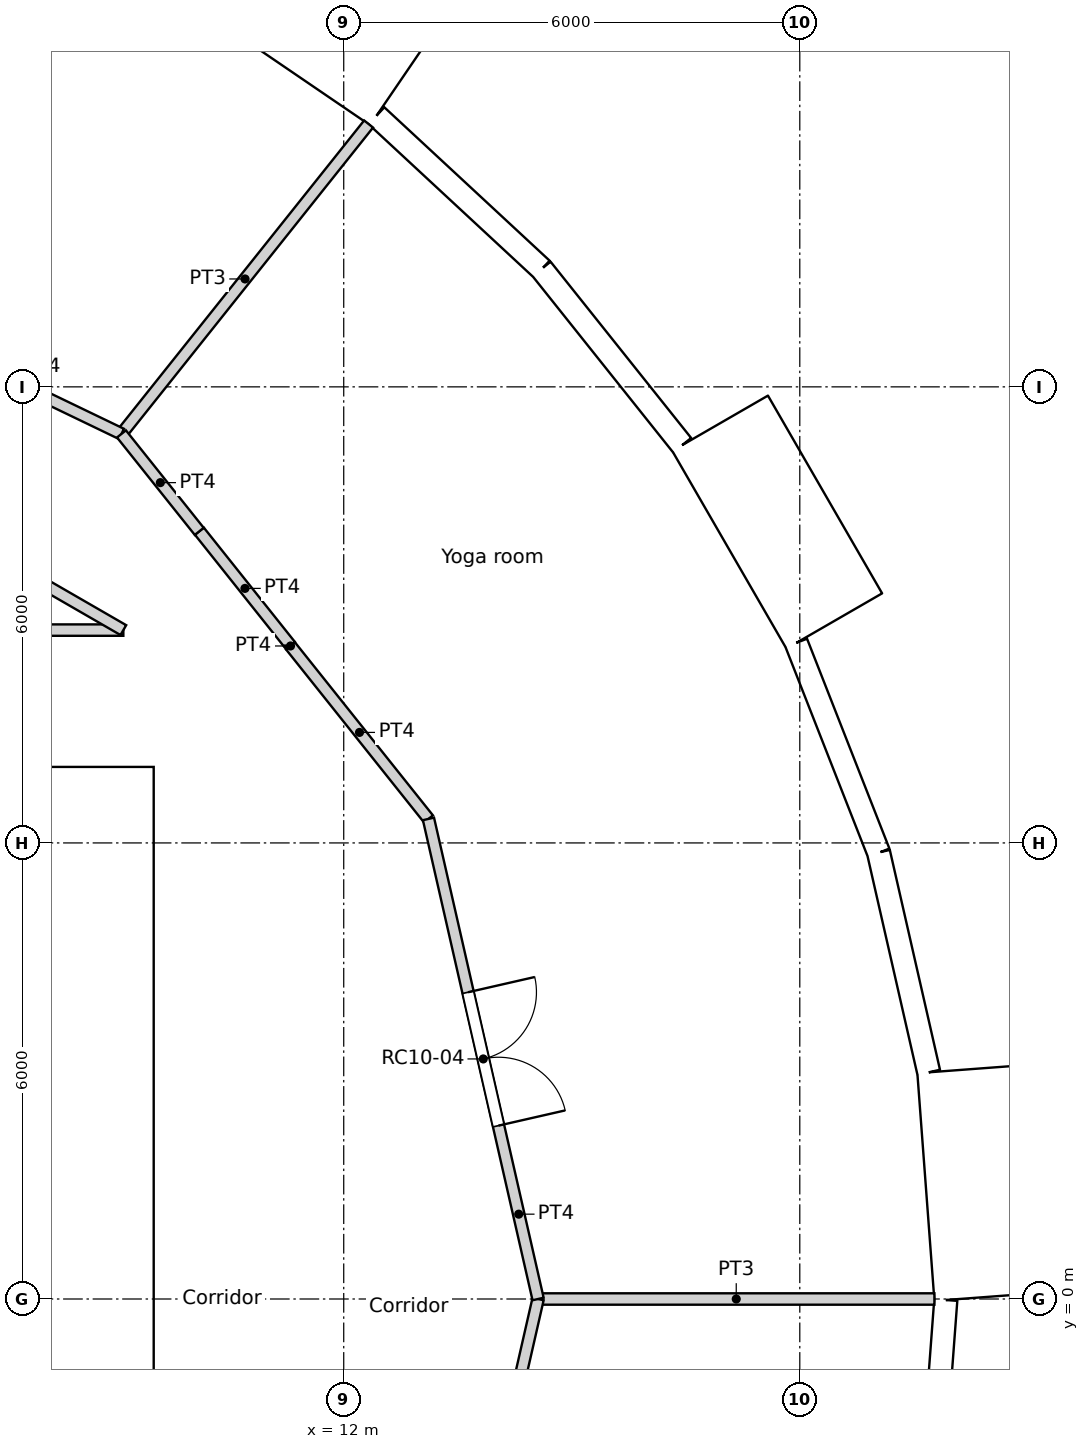
"""IFC4 building model, lengths in metres.
Left out: names, types, materials, properties, quantities, classifications, styles, units other than length and angle.
Written with IfcOpenShell. Run it as: python <this file> out.ifc"""

import sys

from ifc_helpers import new_model, si_unit, direction, frame, frame_2d, origin, origin_2d, place, context, subcontext, project, spatial, rectangle, circle, extrude, element, fill, save


model = new_model("IFC4")
c1 = context("Model", 3, precision=1e-05, world=origin(), true_north=direction((0.0, 1.0)))
c2 = subcontext(c1, "Body", "Model", "MODEL_VIEW")
j1 = project(units=[si_unit("LENGTHUNIT", "METRE"), si_unit("PLANEANGLEUNIT", "RADIAN")], contexts=[c1])
p1 = place(None, origin())
s1 = spatial("IfcSite", under=j1, at=p1, CompositionType="ELEMENT")
p2 = place(p1, origin())
s2 = spatial("IfcBuilding", under=s1, at=p2, CompositionType="ELEMENT")
p3 = place(p2, frame((0.0, 0.0, 323.4)))
s3 = spatial("IfcBuildingStorey", under=s2, at=p3, CompositionType="ELEMENT", Elevation=323.4)
for number, where, z_axis, x_axis in (
    (1, (18.822, 0.0, 0.0), (0.0, 0.0, 1.0), (1.0, 0.0, 0.0)),
    (2, (17.986, 5.548, 0.0), (0.0, 0.0, 1.0), (1.0, 0.0, 0.0)),
    (3, (15.552, 10.603, 0.0), (0.0, 0.0, 1.0), (1.0, 0.0, 0.0)),
    (4, (11.735, 14.716, 0.0), (0.0, 0.0, 1.0), (1.0, 0.0, 0.0)),
):
    element("IfcColumn", number, at=place(p3, frame(where, z_axis=z_axis, x_axis=x_axis)), inside=s3, PredefinedType="COLUMN", context=c2, shape_type="SweptSolid", body=[
        extrude(circle(Radius=0.45, at=origin_2d()), origin(), (0.0, 0.0, 1.0), 3.6),
    ])
p4 = place(p3, frame((20.496, 0.032, -0.35), z_axis=(0.0, 0.0, 1.0), x_axis=(-0.074785902127, 0.997199613339, 0.0)))
e5 = element("IfcWall", 5, at=p4, inside=s3, PredefinedType="ELEMENTEDWALL", context=c2, shape_type="SweptSolid", body=[
    extrude(rectangle(XDim=3.0, YDim=1.45, at=frame_2d((1.5, 0.0))), origin(), (0.0, 0.0, 1.0), 3.6),
])
p5 = place(p4, frame((1.5, 0.0, 1.9)))
e6 = element("IfcOpeningElement", 6, at=p5, cuts=e5, PredefinedType="OPENING", context=c2, shape_type="SweptSolid", body=[
    extrude(circle(Radius=0.9, at=origin_2d()), frame((0.0, 0.735, 0.0), z_axis=(0.0, -1.0, 0.0), x_axis=(1.0, 0.0, 0.0)), (0.0, 0.0, 1.0), 1.47),
])
p6 = place(p3, frame((19.696, 2.984, 0.0), z_axis=(0.0, 0.0, 1.0), x_axis=(-0.222529389789, 0.974925982155, 0.0)))
e7 = element("IfcWall", 7, at=p6, inside=s3, PredefinedType="SOLIDWALL", context=c2, shape_type="SweptSolid", body=[
    extrude(rectangle(XDim=2.962, YDim=0.3, at=frame_2d((1.481, 0.0))), origin(), (0.0, 0.0, 1.0), 3.25),
])
p7 = place(p6, frame((1.481, 0.0, 1.55)))
e8 = element("IfcOpeningElement", 8, at=p7, cuts=e7, PredefinedType="OPENING", context=c2, shape_type="SweptSolid", body=[
    extrude(circle(Radius=0.9, at=origin_2d()), frame((0.0, 0.16, 0.0), z_axis=(0.0, -1.0, 0.0), x_axis=(1.0, 0.0, 0.0)), (0.0, 0.0, 1.0), 0.32),
])
p8 = place(p3, frame((19.037, 5.872, 0.0), z_axis=(0.0, 0.0, 1.0), x_axis=(-0.36530043032, 0.930889679612, 0.0)))
e9 = element("IfcWall", 9, at=p8, inside=s3, PredefinedType="SOLIDWALL", context=c2, shape_type="SweptSolid", body=[
    extrude(rectangle(XDim=2.962, YDim=0.3, at=frame_2d((1.481, 0.0))), origin(), (0.0, 0.0, 1.0), 3.25),
])
p9 = place(p8, frame((1.481, 0.0, 1.55)))
e10 = element("IfcOpeningElement", 10, at=p9, cuts=e9, PredefinedType="OPENING", context=c2, shape_type="SweptSolid", body=[
    extrude(circle(Radius=0.9, at=origin_2d()), frame((0.0, 0.16, 0.0), z_axis=(0.0, -1.0, 0.0), x_axis=(1.0, 0.0, 0.0)), (0.0, 0.0, 1.0), 0.32),
])
p10 = place(p3, frame((18.452, 8.921, -0.35), z_axis=(0.0, 0.0, 1.0), x_axis=(-0.499990139034, 0.866031096941, 0.0)))
e11 = element("IfcWall", 11, at=p10, inside=s3, PredefinedType="ELEMENTEDWALL", context=c2, shape_type="SweptSolid", body=[
    extrude(rectangle(XDim=3.0, YDim=1.45, at=frame_2d((1.5, 0.0))), origin(), (0.0, 0.0, 1.0), 3.6),
])
p11 = place(p10, frame((1.5, 0.0, 1.9)))
e12 = element("IfcOpeningElement", 12, at=p11, cuts=e11, PredefinedType="OPENING", context=c2, shape_type="SweptSolid", body=[
    extrude(circle(Radius=0.9, at=origin_2d()), frame((0.0, 0.735, 0.0), z_axis=(0.0, -1.0, 0.0), x_axis=(1.0, 0.0, 0.0)), (0.0, 0.0, 1.0), 1.47),
])
p12 = place(p3, frame((16.451, 11.234, 0.0), z_axis=(0.0, 0.0, 1.0), x_axis=(-0.623498236992, 0.781824755599, 0.0)))
e13 = element("IfcWall", 13, at=p12, inside=s3, PredefinedType="SOLIDWALL", context=c2, shape_type="SweptSolid", body=[
    extrude(rectangle(XDim=2.962, YDim=0.3, at=frame_2d((1.481, 0.0))), origin(), (0.0, 0.0, 1.0), 3.25),
])
p13 = place(p12, frame((1.481, 0.0, 1.55)))
e14 = element("IfcOpeningElement", 14, at=p13, cuts=e13, PredefinedType="OPENING", context=c2, shape_type="SweptSolid", body=[
    extrude(circle(Radius=0.9, at=origin_2d()), frame((0.0, 0.16, 0.0), z_axis=(0.0, -1.0, 0.0), x_axis=(1.0, 0.0, 0.0)), (0.0, 0.0, 1.0), 0.32),
])
p14 = place(p3, frame((14.604, 13.55, 0.0), z_axis=(0.0, 0.0, 1.0), x_axis=(-0.733066412643, 0.680157066165, 0.0)))
e15 = element("IfcWall", 15, at=p14, inside=s3, PredefinedType="SOLIDWALL", context=c2, shape_type="SweptSolid", body=[
    extrude(rectangle(XDim=2.962, YDim=0.3, at=frame_2d((1.481, 0.0))), origin(), (0.0, 0.0, 1.0), 3.25),
])
p15 = place(p14, frame((1.481, 0.0, 1.55)))
e16 = element("IfcOpeningElement", 16, at=p15, cuts=e15, PredefinedType="OPENING", context=c2, shape_type="SweptSolid", body=[
    extrude(circle(Radius=0.9, at=origin_2d()), frame((0.0, 0.16, 0.0), z_axis=(0.0, -1.0, 0.0), x_axis=(1.0, 0.0, 0.0)), (0.0, 0.0, 1.0), 0.32),
])
p16 = place(p3, frame((12.754, 16.044, -0.35), z_axis=(0.0, 0.0, 1.0), x_axis=(-0.826246281157, 0.563309047392, 0.0)))
e17 = element("IfcWall", 17, at=p16, inside=s3, PredefinedType="ELEMENTEDWALL", context=c2, shape_type="SweptSolid", body=[
    extrude(rectangle(XDim=3.0, YDim=1.45, at=frame_2d((1.5, 0.0))), origin(), (0.0, 0.0, 1.0), 3.6),
])
p17 = place(p16, frame((1.5, 0.0, 1.9)))
e18 = element("IfcOpeningElement", 18, at=p17, cuts=e17, PredefinedType="OPENING", context=c2, shape_type="SweptSolid", body=[
    extrude(circle(Radius=0.9, at=origin_2d()), frame((0.0, 0.735, 0.0), z_axis=(0.0, -1.0, 0.0), x_axis=(1.0, 0.0, 0.0)), (0.0, 0.0, 1.0), 1.47),
])
p18 = place(p3, frame((19.699, -2.969, 0.0), z_axis=(0.0, 0.0, 1.0), x_axis=(0.07474897196, 0.997202382263, 0.0)))
e19 = element("IfcWall", 19, at=p18, inside=s3, PredefinedType="SOLIDWALL", context=c2, shape_type="SweptSolid", body=[
    extrude(rectangle(XDim=2.962, YDim=0.3, at=frame_2d((1.481, 0.0))), origin(), (0.0, 0.0, 1.0), 3.25),
])
p19 = place(p18, frame((1.481, 0.0, 1.55)))
e20 = element("IfcOpeningElement", 20, at=p19, cuts=e19, PredefinedType="OPENING", context=c2, shape_type="SweptSolid", body=[
    extrude(circle(Radius=0.9, at=origin_2d()), frame((0.0, 0.16, 0.0), z_axis=(0.0, -1.0, 0.0), x_axis=(1.0, 0.0, 0.0)), (0.0, 0.0, 1.0), 0.32),
])
p20 = place(p3, frame((-9.5, 6.7, 0.0), z_axis=(0.0, 0.0, 1.0), x_axis=(1.0, 0.0, 0.0)))
e21 = element("IfcWall", 21, at=p20, inside=s3, PredefinedType="SOLIDWALL", context=c2, shape_type="SweptSolid", body=[
    extrude(rectangle(XDim=19.0, YDim=0.6, at=frame_2d((9.5, 0.0))), origin(), (0.0, 0.0, 1.0), 3.6),
])
p21 = place(p20, frame((5.35, 0.0, 0.0)))
e22 = element("IfcOpeningElement", 22, at=p21, cuts=e21, PredefinedType="OPENING", context=c2, shape_type="SweptSolid", body=[
    extrude(rectangle(XDim=1.7, YDim=2.1, at=frame_2d((0.85, 1.05))), frame((0.0, 0.3, 0.0), z_axis=(0.0, -1.0, 0.0), x_axis=(1.0, 0.0, 0.0)), (0.0, 0.0, 1.0), 0.6),
])
p22 = place(p3, frame((9.2, -6.4, 0.0), z_axis=(0.0, 0.0, 1.0), x_axis=(0.0, 1.0, 0.0)))
e23 = element("IfcWall", 23, at=p22, inside=s3, PredefinedType="SOLIDWALL", context=c2, shape_type="SweptSolid", body=[
    extrude(rectangle(XDim=12.8, YDim=0.6, at=frame_2d((6.4, 0.0))), origin(), (0.0, 0.0, 1.0), 3.6),
])
p23 = place(p22, frame((6.4, 0.0, 0.0)))
e24 = element("IfcOpeningElement", 24, at=p23, cuts=e23, PredefinedType="OPENING", context=c2, shape_type="SweptSolid", body=[
    extrude(rectangle(XDim=1.8, YDim=2.1, at=frame_2d((0.9, 1.05))), frame((0.0, 0.3, 0.0), z_axis=(0.0, -1.0, 0.0), x_axis=(1.0, 0.0, 0.0)), (0.0, 0.0, 1.0), 0.6),
])
p24 = place(p3, frame((-4.35, 3.1, 0.0), z_axis=(0.0, 0.0, 1.0), x_axis=(1.0, 0.0, 0.0)))
e25 = element("IfcWall", 25, at=p24, inside=s3, PredefinedType="SOLIDWALL", context=c2, shape_type="SweptSolid", body=[
    extrude(rectangle(XDim=13.25, YDim=0.3, at=frame_2d((6.625, 0.0))), origin(), (0.0, 0.0, 1.0), 3.25),
])
p25 = place(p24, frame((2.95, 0.0, 0.0)))
e26 = element("IfcOpeningElement", 26, at=p25, cuts=e25, PredefinedType="OPENING", context=c2, shape_type="SweptSolid", body=[
    extrude(rectangle(XDim=1.1, YDim=2.1, at=frame_2d((0.55, 1.05))), frame((0.0, 0.15, 0.0), z_axis=(0.0, -1.0, 0.0), x_axis=(1.0, 0.0, 0.0)), (0.0, 0.0, 1.0), 0.3),
])
p26 = place(p24, frame((5.75, 0.0, 0.0)))
e27 = element("IfcOpeningElement", 27, at=p26, cuts=e25, PredefinedType="OPENING", context=c2, shape_type="SweptSolid", body=[
    extrude(rectangle(XDim=1.1, YDim=2.1, at=frame_2d((0.55, 1.05))), frame((0.0, 0.15, 0.0), z_axis=(0.0, -1.0, 0.0), x_axis=(1.0, 0.0, 0.0)), (0.0, 0.0, 1.0), 0.3),
])
p27 = place(p24, frame((8.55, 0.0, 0.0)))
e28 = element("IfcOpeningElement", 28, at=p27, cuts=e25, PredefinedType="OPENING", context=c2, shape_type="SweptSolid", body=[
    extrude(rectangle(XDim=1.1, YDim=2.1, at=frame_2d((0.55, 1.05))), frame((0.0, 0.15, 0.0), z_axis=(0.0, -1.0, 0.0), x_axis=(1.0, 0.0, 0.0)), (0.0, 0.0, 1.0), 0.3),
])
p28 = place(p3, frame((-0.014, 8.8, 0.0), z_axis=(0.0, 0.0, 1.0), x_axis=(1.0, 0.0, 0.0)))
e29 = element("IfcWall", 29, at=p28, inside=s3, PredefinedType="PARTITIONING", context=c2, shape_type="SweptSolid", body=[
    extrude(rectangle(XDim=9.115, YDim=0.15, at=frame_2d((4.557, 0.0))), origin(), (0.0, 0.0, 1.0), 3.25),
])
p29 = place(p28, frame((4.053, 0.0, 0.0)))
e30 = element("IfcOpeningElement", 30, at=p29, cuts=e29, PredefinedType="OPENING", context=c2, shape_type="SweptSolid", body=[
    extrude(rectangle(XDim=1.0, YDim=2.04, at=frame_2d((0.5, 1.02))), frame((0.0, 0.075, 0.0), z_axis=(0.0, -1.0, 0.0), x_axis=(1.0, 0.0, 0.0)), (0.0, 0.0, 1.0), 0.15),
])
p30 = place(p3, frame((10.101, 10.101, 0.0), z_axis=(0.0, 0.0, 1.0), x_axis=(0.623130947784, -0.782117524362, 0.0)))
e31 = element("IfcWall", 31, at=p30, inside=s3, PredefinedType="PARTITIONING", context=c2, shape_type="SweptSolid", body=[
    extrude(rectangle(XDim=1.924, YDim=0.15, at=frame_2d((0.962, 0.0))), origin(), (0.0, 0.0, 1.0), 3.25),
])
p31 = place(p3, frame((11.3, 8.586, 0.0), z_axis=(0.0, 0.0, 1.0), x_axis=(0.0, 1.0, 0.0)))
e32 = element("IfcWall", 32, at=p31, inside=s3, PredefinedType="PARTITIONING", context=c2, shape_type="SweptSolid", body=[
    extrude(rectangle(XDim=0.01, YDim=0.15, at=frame_2d((0.005, 0.0))), origin(), (0.0, 0.0, 1.0), 3.25),
])
p32 = place(p3, frame((11.3, 8.592, 0.0), z_axis=(0.0, 0.0, 1.0), x_axis=(0.623446514299, -0.781866001185, 0.0)))
e33 = element("IfcWall", 33, at=p32, inside=s3, PredefinedType="PARTITIONING", context=c2, shape_type="SweptSolid", body=[
    extrude(rectangle(XDim=2.911, YDim=0.15, at=frame_2d((1.456, 0.0))), origin(), (0.0, 0.0, 1.0), 3.25),
])
p33 = place(p3, frame((13.115, 6.316, 0.0), z_axis=(0.0, 0.0, 1.0), x_axis=(0.222568978642, -0.97491694505, 0.0)))
e34 = element("IfcWall", 34, at=p33, inside=s3, PredefinedType="PARTITIONING", context=c2, shape_type="SweptSolid", body=[
    extrude(rectangle(XDim=6.479, YDim=0.15, at=frame_2d((3.239, 0.0))), origin(), (0.0, 0.0, 1.0), 3.25),
])
p34 = place(p33, frame((2.339, 0.0, 0.0)))
e35 = element("IfcOpeningElement", 35, at=p34, cuts=e34, PredefinedType="OPENING", context=c2, shape_type="SweptSolid", body=[
    extrude(rectangle(XDim=1.8, YDim=2.1, at=frame_2d((0.9, 1.05))), frame((0.0, 0.075, 0.0), z_axis=(0.0, -1.0, 0.0), x_axis=(1.0, 0.0, 0.0)), (0.0, 0.0, 1.0), 0.15),
])
p35 = place(p3, frame((13.115, -6.316, 0.0), z_axis=(0.0, 0.0, 1.0), x_axis=(0.222568978642, 0.97491694505, 0.0)))
e36 = element("IfcWall", 36, at=p35, inside=s3, PredefinedType="PARTITIONING", context=c2, shape_type="SweptSolid", body=[
    extrude(rectangle(XDim=6.479, YDim=0.15, at=frame_2d((3.239, 0.0))), origin(), (0.0, 0.0, 1.0), 3.25),
])
p36 = place(p35, frame((2.74, 0.0, 0.0)))
e37 = element("IfcOpeningElement", 37, at=p36, cuts=e36, PredefinedType="OPENING", context=c2, shape_type="SweptSolid", body=[
    extrude(rectangle(XDim=1.0, YDim=2.04, at=frame_2d((0.5, 1.02))), frame((0.0, 0.075, 0.0), z_axis=(0.0, -1.0, 0.0), x_axis=(1.0, 0.0, 0.0)), (0.0, 0.0, 1.0), 0.15),
])
p37 = place(p3, frame((3.261, 12.171, 0.0), z_axis=(0.0, 0.0, 1.0), x_axis=(0.866066809554, -0.499928276245, 0.0)))
e38 = element("IfcWall", 38, at=p37, inside=s3, PredefinedType="PARTITIONING", context=c2, shape_type="SweptSolid", body=[
    extrude(rectangle(XDim=6.743, YDim=0.15, at=frame_2d((3.371, 0.0))), origin(), (0.0, 0.0, 1.0), 3.25),
])
p38 = place(p3, frame((9.076, 11.381, 0.0), z_axis=(0.0, 0.0, 1.0), x_axis=(0.623805208652, -0.781579849829, 0.0)))
e39 = element("IfcWall", 39, at=p38, inside=s3, PredefinedType="PARTITIONING", context=c2, shape_type="SweptSolid", body=[
    extrude(rectangle(XDim=1.64, YDim=0.15, at=frame_2d((0.82, 0.0))), origin(), (0.0, 0.0, 1.0), 3.25),
])
p39 = place(p3, frame((3.239, 14.192, 0.0), z_axis=(0.0, 0.0, 1.0), x_axis=(0.900976027191, -0.433868872388, 0.0)))
e40 = element("IfcWall", 40, at=p39, inside=s3, PredefinedType="PARTITIONING", context=c2, shape_type="SweptSolid", body=[
    extrude(rectangle(XDim=6.479, YDim=0.15, at=frame_2d((3.239, 0.0))), origin(), (0.0, 0.0, 1.0), 3.25),
])
p40 = place(p39, frame((2.339, 0.0, 0.0)))
e41 = element("IfcOpeningElement", 41, at=p40, cuts=e40, PredefinedType="OPENING", context=c2, shape_type="SweptSolid", body=[
    extrude(rectangle(XDim=1.8, YDim=2.1, at=frame_2d((0.9, 1.05))), frame((0.0, 0.075, 0.0), z_axis=(0.0, -1.0, 0.0), x_axis=(1.0, 0.0, 0.0)), (0.0, 0.0, 1.0), 0.15),
])
p41 = place(p3, frame((9.076, 11.381, 0.0), z_axis=(0.0, 0.0, 1.0), x_axis=(0.623460949534, 0.781854490558, 0.0)))
e42 = element("IfcWall", 42, at=p41, inside=s3, PredefinedType="PARTITIONING", context=c2, shape_type="SweptSolid", body=[
    extrude(rectangle(XDim=5.214, YDim=0.15, at=frame_2d((2.607, 0.0))), origin(), (0.0, 0.0, 1.0), 3.25),
])
p42 = place(p3, frame((14.557, 0.0, 0.0), z_axis=(0.0, 0.0, 1.0), x_axis=(1.0, 0.0, 0.0)))
e43 = element("IfcWall", 43, at=p42, inside=s3, PredefinedType="PARTITIONING", context=c2, shape_type="SweptSolid", body=[
    extrude(rectangle(XDim=5.214, YDim=0.15, at=frame_2d((2.607, 0.0))), origin(), (0.0, 0.0, 1.0), 3.25),
])
p43 = place(p5, origin())
e44 = element("IfcWindow", 44, at=p43, inside=s3, PartitioningType="SINGLE_PANEL", PredefinedType="WINDOW", context=c2, shape_type="SweptSolid", body=[
    extrude(circle(Radius=0.9, at=origin_2d()), frame((0.0, 0.695, 0.0), z_axis=(0.0, -1.0, 0.0), x_axis=(1.0, 0.0, 0.0)), (0.0, 0.0, 1.0), 0.1),
])
fill(e6, e44)
p44 = place(p7, origin())
e45 = element("IfcWindow", 45, at=p44, inside=s3, PartitioningType="SINGLE_PANEL", PredefinedType="WINDOW", context=c2, shape_type="SweptSolid", body=[
    extrude(circle(Radius=0.9, at=origin_2d()), frame((0.0, 0.12, 0.0), z_axis=(0.0, -1.0, 0.0), x_axis=(1.0, 0.0, 0.0)), (0.0, 0.0, 1.0), 0.1),
])
fill(e8, e45)
p45 = place(p9, origin())
e46 = element("IfcWindow", 46, at=p45, inside=s3, PartitioningType="SINGLE_PANEL", PredefinedType="WINDOW", context=c2, shape_type="SweptSolid", body=[
    extrude(circle(Radius=0.9, at=origin_2d()), frame((0.0, 0.12, 0.0), z_axis=(0.0, -1.0, 0.0), x_axis=(1.0, 0.0, 0.0)), (0.0, 0.0, 1.0), 0.1),
])
fill(e10, e46)
p46 = place(p11, origin())
e47 = element("IfcWindow", 47, at=p46, inside=s3, PartitioningType="SINGLE_PANEL", PredefinedType="WINDOW", context=c2, shape_type="SweptSolid", body=[
    extrude(circle(Radius=0.9, at=origin_2d()), frame((0.0, 0.695, 0.0), z_axis=(0.0, -1.0, 0.0), x_axis=(1.0, 0.0, 0.0)), (0.0, 0.0, 1.0), 0.1),
])
fill(e12, e47)
p47 = place(p13, origin())
e48 = element("IfcWindow", 48, at=p47, inside=s3, PartitioningType="SINGLE_PANEL", PredefinedType="WINDOW", context=c2, shape_type="SweptSolid", body=[
    extrude(circle(Radius=0.9, at=origin_2d()), frame((0.0, 0.12, 0.0), z_axis=(0.0, -1.0, 0.0), x_axis=(1.0, 0.0, 0.0)), (0.0, 0.0, 1.0), 0.1),
])
fill(e14, e48)
p48 = place(p15, origin())
e49 = element("IfcWindow", 49, at=p48, inside=s3, PartitioningType="SINGLE_PANEL", PredefinedType="WINDOW", context=c2, shape_type="SweptSolid", body=[
    extrude(circle(Radius=0.9, at=origin_2d()), frame((0.0, 0.12, 0.0), z_axis=(0.0, -1.0, 0.0), x_axis=(1.0, 0.0, 0.0)), (0.0, 0.0, 1.0), 0.1),
])
fill(e16, e49)
p49 = place(p17, origin())
e50 = element("IfcWindow", 50, at=p49, inside=s3, PartitioningType="SINGLE_PANEL", PredefinedType="WINDOW", context=c2, shape_type="SweptSolid", body=[
    extrude(circle(Radius=0.9, at=origin_2d()), frame((0.0, 0.695, 0.0), z_axis=(0.0, -1.0, 0.0), x_axis=(1.0, 0.0, 0.0)), (0.0, 0.0, 1.0), 0.1),
])
fill(e18, e50)
p50 = place(p19, origin())
e51 = element("IfcWindow", 51, at=p50, inside=s3, PartitioningType="SINGLE_PANEL", PredefinedType="WINDOW", context=c2, shape_type="SweptSolid", body=[
    extrude(circle(Radius=0.9, at=origin_2d()), frame((0.0, 0.12, 0.0), z_axis=(0.0, -1.0, 0.0), x_axis=(1.0, 0.0, 0.0)), (0.0, 0.0, 1.0), 0.1),
])
fill(e20, e51)
p51 = place(p23, origin())
e52 = element("IfcDoor", 52, at=p51, inside=s3, OperationType="DOUBLE_DOOR_SINGLE_SWING", PredefinedType="DOOR", context=c2, shape_type="SweptSolid", body=[
    extrude(rectangle(XDim=1.8, YDim=2.1, at=frame_2d((0.9, 1.05))), frame((0.0, 0.025, 0.0), z_axis=(0.0, -1.0, 0.0), x_axis=(1.0, 0.0, 0.0)), (0.0, 0.0, 1.0), 0.05),
])
fill(e24, e52)
p52 = place(p34, origin())
e53 = element("IfcDoor", 53, at=p52, inside=s3, OperationType="DOUBLE_DOOR_SINGLE_SWING", PredefinedType="DOOR", context=c2, shape_type="SweptSolid", body=[
    extrude(rectangle(XDim=1.8, YDim=2.1, at=frame_2d((0.9, 1.05))), frame((0.0, 0.025, 0.0), z_axis=(0.0, -1.0, 0.0), x_axis=(1.0, 0.0, 0.0)), (0.0, 0.0, 1.0), 0.05),
])
fill(e35, e53)
save(model, sys.argv[1])
